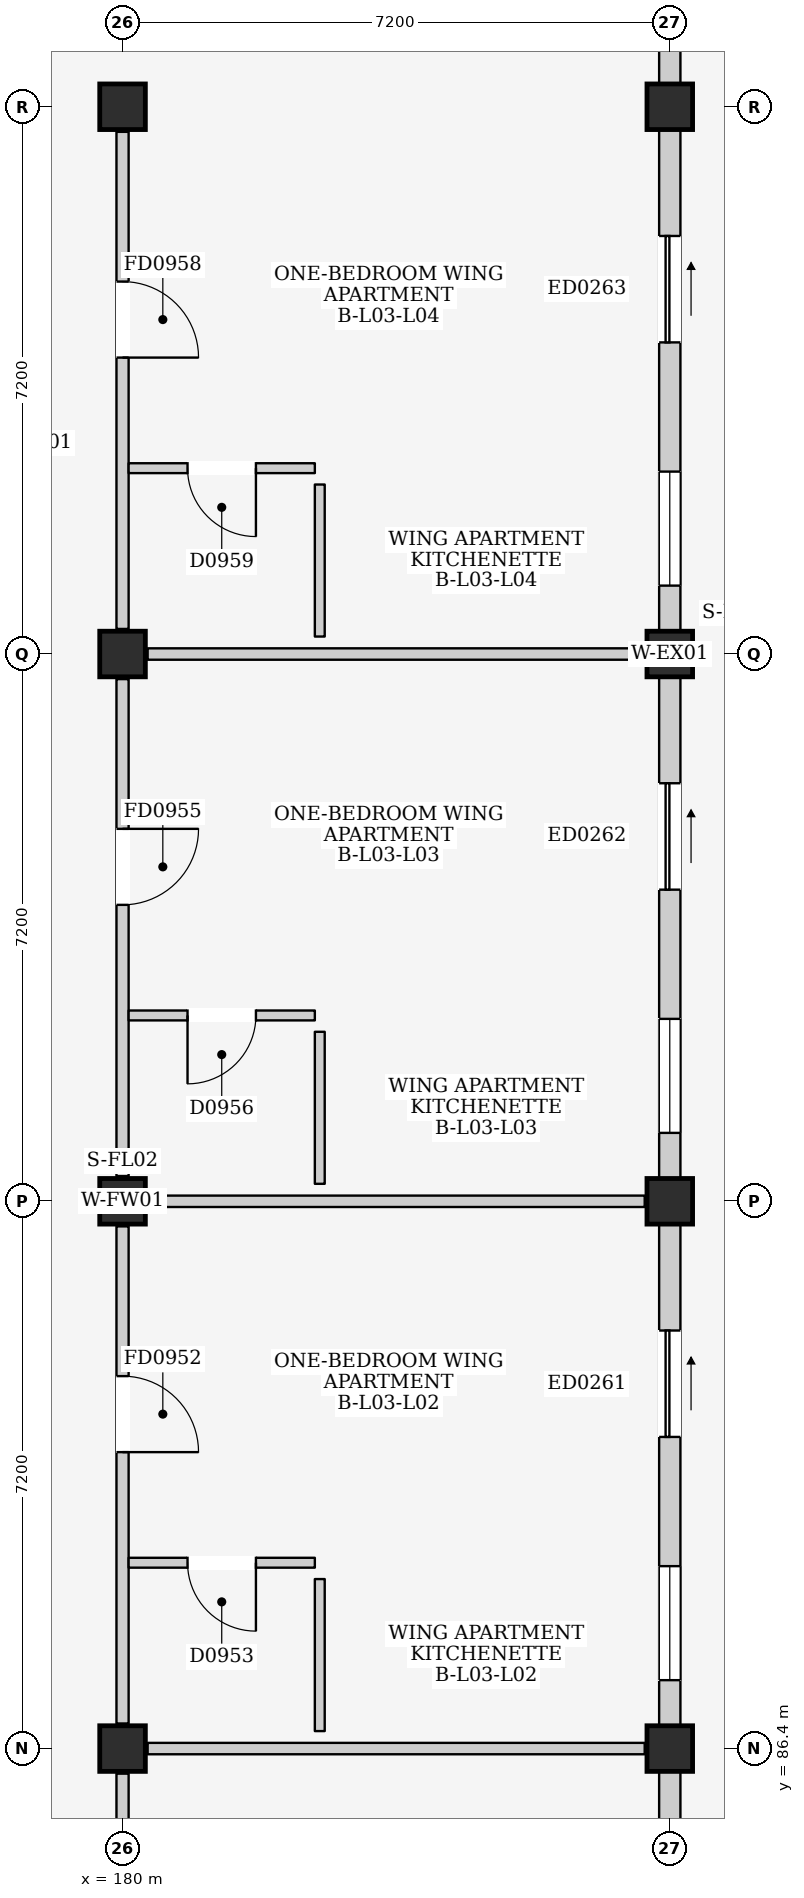
"""IFC4 building model, lengths in metres.
Left out: names, types, materials, properties, quantities, classifications, styles, units other than length and angle.
Written with IfcOpenShell. Run it as: python <this file> out.ifc"""

import sys

from ifc_helpers import new_model, si_unit, direction, frame, frame_2d, origin, origin_2d, place, context, subcontext, project, spatial, rectangle, extrude, element, fill, save


model = new_model("IFC4")
c1 = context("Model", 3, precision=1e-05, world=origin(), true_north=direction((0.0, 1.0)))
c2 = subcontext(c1, "Body", "Model", "MODEL_VIEW")
j1 = project(units=[si_unit("LENGTHUNIT", "METRE"), si_unit("PLANEANGLEUNIT", "RADIAN")], contexts=[c1])
p1 = place(None, origin())
s1 = spatial("IfcSite", under=j1, at=p1, CompositionType="ELEMENT")
p2 = place(p1, origin())
s2 = spatial("IfcBuilding", under=s1, at=p2, CompositionType="ELEMENT")
p3 = place(p2, frame((0.0, 0.0, 12.2)))
s3 = spatial("IfcBuildingStorey", under=s2, at=p3, CompositionType="ELEMENT", Elevation=12.2)
for number, where, z_axis, x_axis in (
    (1, (180.0, 86.4, 0.0), (0.0, 0.0, 1.0), (1.0, 0.0, 0.0)),
    (2, (180.0, 93.6, 0.0), (0.0, 0.0, 1.0), (1.0, 0.0, 0.0)),
    (3, (180.0, 100.8, 0.0), (0.0, 0.0, 1.0), (1.0, 0.0, 0.0)),
    (4, (180.0, 108.0, 0.0), (0.0, 0.0, 1.0), (1.0, 0.0, 0.0)),
    (5, (187.2, 86.4, 0.0), (0.0, 0.0, 1.0), (1.0, 0.0, 0.0)),
    (6, (187.2, 93.6, 0.0), (0.0, 0.0, 1.0), (1.0, 0.0, 0.0)),
    (7, (187.2, 100.8, 0.0), (0.0, 0.0, 1.0), (1.0, 0.0, 0.0)),
    (8, (187.2, 108.0, 0.0), (0.0, 0.0, 1.0), (1.0, 0.0, 0.0)),
):
    element("IfcColumn", number, at=place(p3, frame(where, z_axis=z_axis, x_axis=x_axis)), inside=s3, PredefinedType="COLUMN", context=c2, shape_type="SweptSolid", body=[
        extrude(rectangle(XDim=0.6, YDim=0.6, at=origin_2d()), origin(), (0.0, 0.0, 1.0), 3.2),
    ])
p4 = place(p3, frame((187.2, 79.5, 0.0), z_axis=(0.0, 0.0, 1.0), x_axis=(0.0, 1.0, 0.0)))
e9 = element("IfcWall", 9, at=p4, inside=s3, PredefinedType="ELEMENTEDWALL", context=c2, shape_type="SweptSolid", body=[
    extrude(rectangle(XDim=6.6, YDim=0.28, at=frame_2d((3.3, 0.0))), origin(), (0.0, 0.0, 1.0), 2.445),
])
p5 = place(p4, frame((3.8, 0.0, 0.0)))
e10 = element("IfcOpeningElement", 10, at=p5, cuts=e9, PredefinedType="OPENING", context=c2, shape_type="SweptSolid", body=[
    extrude(rectangle(XDim=1.4, YDim=2.1, at=frame_2d((0.7, 1.05))), frame((0.0, 0.155, 0.0), z_axis=(0.0, -1.0, 0.0), x_axis=(1.0, 0.0, 0.0)), (0.0, 0.0, 1.0), 0.31),
])
p6 = place(p4, frame((0.6, 0.0, 0.835)))
e11 = element("IfcOpeningElement", 11, at=p6, cuts=e9, PredefinedType="OPENING", context=c2, shape_type="SweptSolid", body=[
    extrude(rectangle(XDim=1.5, YDim=1.5, at=frame_2d((0.75, 0.75))), frame((0.0, 0.155, 0.0), z_axis=(0.0, -1.0, 0.0), x_axis=(1.0, 0.0, 0.0)), (0.0, 0.0, 1.0), 0.31),
])
p7 = place(p3, frame((187.2, 86.7, 0.0), z_axis=(0.0, 0.0, 1.0), x_axis=(0.0, 1.0, 0.0)))
e12 = element("IfcWall", 12, at=p7, inside=s3, PredefinedType="ELEMENTEDWALL", context=c2, shape_type="SweptSolid", body=[
    extrude(rectangle(XDim=6.6, YDim=0.28, at=frame_2d((3.3, 0.0))), origin(), (0.0, 0.0, 1.0), 2.445),
])
p8 = place(p7, frame((3.8, 0.0, 0.0)))
e13 = element("IfcOpeningElement", 13, at=p8, cuts=e12, PredefinedType="OPENING", context=c2, shape_type="SweptSolid", body=[
    extrude(rectangle(XDim=1.4, YDim=2.1, at=frame_2d((0.7, 1.05))), frame((0.0, 0.155, 0.0), z_axis=(0.0, -1.0, 0.0), x_axis=(1.0, 0.0, 0.0)), (0.0, 0.0, 1.0), 0.31),
])
p9 = place(p7, frame((0.6, 0.0, 0.835)))
e14 = element("IfcOpeningElement", 14, at=p9, cuts=e12, PredefinedType="OPENING", context=c2, shape_type="SweptSolid", body=[
    extrude(rectangle(XDim=1.5, YDim=1.5, at=frame_2d((0.75, 0.75))), frame((0.0, 0.155, 0.0), z_axis=(0.0, -1.0, 0.0), x_axis=(1.0, 0.0, 0.0)), (0.0, 0.0, 1.0), 0.31),
])
p10 = place(p3, frame((187.2, 93.9, 0.0), z_axis=(0.0, 0.0, 1.0), x_axis=(0.0, 1.0, 0.0)))
e15 = element("IfcWall", 15, at=p10, inside=s3, PredefinedType="ELEMENTEDWALL", context=c2, shape_type="SweptSolid", body=[
    extrude(rectangle(XDim=6.6, YDim=0.28, at=frame_2d((3.3, 0.0))), origin(), (0.0, 0.0, 1.0), 2.445),
])
p11 = place(p10, frame((3.8, 0.0, 0.0)))
e16 = element("IfcOpeningElement", 16, at=p11, cuts=e15, PredefinedType="OPENING", context=c2, shape_type="SweptSolid", body=[
    extrude(rectangle(XDim=1.4, YDim=2.1, at=frame_2d((0.7, 1.05))), frame((0.0, 0.155, 0.0), z_axis=(0.0, -1.0, 0.0), x_axis=(1.0, 0.0, 0.0)), (0.0, 0.0, 1.0), 0.31),
])
p12 = place(p10, frame((0.6, 0.0, 0.835)))
e17 = element("IfcOpeningElement", 17, at=p12, cuts=e15, PredefinedType="OPENING", context=c2, shape_type="SweptSolid", body=[
    extrude(rectangle(XDim=1.5, YDim=1.5, at=frame_2d((0.75, 0.75))), frame((0.0, 0.155, 0.0), z_axis=(0.0, -1.0, 0.0), x_axis=(1.0, 0.0, 0.0)), (0.0, 0.0, 1.0), 0.31),
])
p13 = place(p3, frame((187.2, 101.1, 0.0), z_axis=(0.0, 0.0, 1.0), x_axis=(0.0, 1.0, 0.0)))
e18 = element("IfcWall", 18, at=p13, inside=s3, PredefinedType="ELEMENTEDWALL", context=c2, shape_type="SweptSolid", body=[
    extrude(rectangle(XDim=6.6, YDim=0.28, at=frame_2d((3.3, 0.0))), origin(), (0.0, 0.0, 1.0), 2.445),
])
p14 = place(p13, frame((3.8, 0.0, 0.0)))
e19 = element("IfcOpeningElement", 19, at=p14, cuts=e18, PredefinedType="OPENING", context=c2, shape_type="SweptSolid", body=[
    extrude(rectangle(XDim=1.4, YDim=2.1, at=frame_2d((0.7, 1.05))), frame((0.0, 0.155, 0.0), z_axis=(0.0, -1.0, 0.0), x_axis=(1.0, 0.0, 0.0)), (0.0, 0.0, 1.0), 0.31),
])
p15 = place(p13, frame((0.6, 0.0, 0.835)))
e20 = element("IfcOpeningElement", 20, at=p15, cuts=e18, PredefinedType="OPENING", context=c2, shape_type="SweptSolid", body=[
    extrude(rectangle(XDim=1.5, YDim=1.5, at=frame_2d((0.75, 0.75))), frame((0.0, 0.155, 0.0), z_axis=(0.0, -1.0, 0.0), x_axis=(1.0, 0.0, 0.0)), (0.0, 0.0, 1.0), 0.31),
])
p16 = place(p3, frame((187.2, 108.3, 0.0), z_axis=(0.0, 0.0, 1.0), x_axis=(0.0, 1.0, 0.0)))
e21 = element("IfcWall", 21, at=p16, inside=s3, PredefinedType="ELEMENTEDWALL", context=c2, shape_type="SweptSolid", body=[
    extrude(rectangle(XDim=6.6, YDim=0.28, at=frame_2d((3.3, 0.0))), origin(), (0.0, 0.0, 1.0), 2.445),
])
p17 = place(p16, frame((3.65, 0.0, 0.0)))
e22 = element("IfcOpeningElement", 22, at=p17, cuts=e21, PredefinedType="OPENING", context=c2, shape_type="SweptSolid", body=[
    extrude(rectangle(XDim=1.4, YDim=2.1, at=frame_2d((0.7, 1.05))), frame((0.0, 0.155, 0.0), z_axis=(0.0, -1.0, 0.0), x_axis=(1.0, 0.0, 0.0)), (0.0, 0.0, 1.0), 0.31),
])
p18 = place(p3, frame((180.0, 79.53, 0.0), z_axis=(0.0, 0.0, 1.0), x_axis=(0.0, 1.0, 0.0)))
e23 = element("IfcWall", 23, at=p18, inside=s3, PredefinedType="PARTITIONING", context=c2, shape_type="SweptSolid", body=[
    extrude(rectangle(XDim=6.54, YDim=0.16, at=frame_2d((3.27, 0.0))), origin(), (0.0, 0.0, 1.0), 2.415),
])
p19 = place(p18, frame((3.57, 0.0, 0.0)))
e24 = element("IfcOpeningElement", 24, at=p19, cuts=e23, PredefinedType="OPENING", context=c2, shape_type="SweptSolid", body=[
    extrude(rectangle(XDim=1.0, YDim=2.15, at=frame_2d((0.5, 1.075))), frame((0.0, 0.095, 0.0), z_axis=(0.0, -1.0, 0.0), x_axis=(1.0, 0.0, 0.0)), (0.0, 0.0, 1.0), 0.19),
])
p20 = place(p3, frame((180.33, 86.4, 0.0), z_axis=(0.0, 0.0, 1.0), x_axis=(1.0, 0.0, 0.0)))
e25 = element("IfcWall", 25, at=p20, inside=s3, PredefinedType="PARTITIONING", context=c2, shape_type="SweptSolid", body=[
    extrude(rectangle(XDim=6.54, YDim=0.15, at=frame_2d((3.27, 0.0))), origin(), (0.0, 0.0, 1.0), 2.365),
])
p21 = place(p3, frame((180.0, 86.73, 0.0), z_axis=(0.0, 0.0, 1.0), x_axis=(0.0, 1.0, 0.0)))
e26 = element("IfcWall", 26, at=p21, inside=s3, PredefinedType="PARTITIONING", context=c2, shape_type="SweptSolid", body=[
    extrude(rectangle(XDim=6.54, YDim=0.16, at=frame_2d((3.27, 0.0))), origin(), (0.0, 0.0, 1.0), 2.415),
])
p22 = place(p21, frame((3.57, 0.0, 0.0)))
e27 = element("IfcOpeningElement", 27, at=p22, cuts=e26, PredefinedType="OPENING", context=c2, shape_type="SweptSolid", body=[
    extrude(rectangle(XDim=1.0, YDim=2.15, at=frame_2d((0.5, 1.075))), frame((0.0, 0.095, 0.0), z_axis=(0.0, -1.0, 0.0), x_axis=(1.0, 0.0, 0.0)), (0.0, 0.0, 1.0), 0.19),
])
p23 = place(p3, frame((180.33, 93.6, 0.0), z_axis=(0.0, 0.0, 1.0), x_axis=(1.0, 0.0, 0.0)))
e28 = element("IfcWall", 28, at=p23, inside=s3, PredefinedType="PARTITIONING", context=c2, shape_type="SweptSolid", body=[
    extrude(rectangle(XDim=6.54, YDim=0.15, at=frame_2d((3.27, 0.0))), origin(), (0.0, 0.0, 1.0), 2.365),
])
p24 = place(p3, frame((180.08, 88.845, 0.0), z_axis=(0.0, 0.0, 1.0), x_axis=(1.0, 0.0, 0.0)))
e29 = element("IfcWall", 29, at=p24, inside=s3, PredefinedType="PARTITIONING", context=c2, shape_type="SweptSolid", body=[
    extrude(rectangle(XDim=2.45, YDim=0.13, at=frame_2d((1.225, 0.0))), origin(), (0.0, 0.0, 1.0), 2.98),
])
p25 = place(p24, frame((0.775, 0.0, 0.0)))
e30 = element("IfcOpeningElement", 30, at=p25, cuts=e29, PredefinedType="OPENING", context=c2, shape_type="SweptSolid", body=[
    extrude(rectangle(XDim=0.9, YDim=2.1, at=frame_2d((0.45, 1.05))), frame((0.0, 0.08, 0.0), z_axis=(0.0, -1.0, 0.0), x_axis=(1.0, 0.0, 0.0)), (0.0, 0.0, 1.0), 0.16),
])
p26 = place(p3, frame((182.595, 86.63, 0.0), z_axis=(0.0, 0.0, 1.0), x_axis=(0.0, 1.0, 0.0)))
e31 = element("IfcWall", 31, at=p26, inside=s3, PredefinedType="PARTITIONING", context=c2, shape_type="SweptSolid", body=[
    extrude(rectangle(XDim=2.0, YDim=0.13, at=frame_2d((1.0, 0.0))), origin(), (0.0, 0.0, 1.0), 2.98),
])
p27 = place(p3, frame((180.0, 93.93, 0.0), z_axis=(0.0, 0.0, 1.0), x_axis=(0.0, 1.0, 0.0)))
e32 = element("IfcWall", 32, at=p27, inside=s3, PredefinedType="PARTITIONING", context=c2, shape_type="SweptSolid", body=[
    extrude(rectangle(XDim=6.54, YDim=0.16, at=frame_2d((3.27, 0.0))), origin(), (0.0, 0.0, 1.0), 2.415),
])
p28 = place(p27, frame((3.57, 0.0, 0.0)))
e33 = element("IfcOpeningElement", 33, at=p28, cuts=e32, PredefinedType="OPENING", context=c2, shape_type="SweptSolid", body=[
    extrude(rectangle(XDim=1.0, YDim=2.15, at=frame_2d((0.5, 1.075))), frame((0.0, 0.095, 0.0), z_axis=(0.0, -1.0, 0.0), x_axis=(1.0, 0.0, 0.0)), (0.0, 0.0, 1.0), 0.19),
])
p29 = place(p3, frame((180.33, 100.8, 0.0), z_axis=(0.0, 0.0, 1.0), x_axis=(1.0, 0.0, 0.0)))
e34 = element("IfcWall", 34, at=p29, inside=s3, PredefinedType="PARTITIONING", context=c2, shape_type="SweptSolid", body=[
    extrude(rectangle(XDim=6.54, YDim=0.15, at=frame_2d((3.27, 0.0))), origin(), (0.0, 0.0, 1.0), 2.365),
])
p30 = place(p3, frame((180.08, 96.045, 0.0), z_axis=(0.0, 0.0, 1.0), x_axis=(1.0, 0.0, 0.0)))
e35 = element("IfcWall", 35, at=p30, inside=s3, PredefinedType="PARTITIONING", context=c2, shape_type="SweptSolid", body=[
    extrude(rectangle(XDim=2.45, YDim=0.13, at=frame_2d((1.225, 0.0))), origin(), (0.0, 0.0, 1.0), 2.98),
])
p31 = place(p30, frame((0.775, 0.0, 0.0)))
e36 = element("IfcOpeningElement", 36, at=p31, cuts=e35, PredefinedType="OPENING", context=c2, shape_type="SweptSolid", body=[
    extrude(rectangle(XDim=0.9, YDim=2.1, at=frame_2d((0.45, 1.05))), frame((0.0, 0.08, 0.0), z_axis=(0.0, -1.0, 0.0), x_axis=(1.0, 0.0, 0.0)), (0.0, 0.0, 1.0), 0.16),
])
p32 = place(p3, frame((182.595, 93.83, 0.0), z_axis=(0.0, 0.0, 1.0), x_axis=(0.0, 1.0, 0.0)))
e37 = element("IfcWall", 37, at=p32, inside=s3, PredefinedType="PARTITIONING", context=c2, shape_type="SweptSolid", body=[
    extrude(rectangle(XDim=2.0, YDim=0.13, at=frame_2d((1.0, 0.0))), origin(), (0.0, 0.0, 1.0), 2.98),
])
p33 = place(p3, frame((180.0, 101.13, 0.0), z_axis=(0.0, 0.0, 1.0), x_axis=(0.0, 1.0, 0.0)))
e38 = element("IfcWall", 38, at=p33, inside=s3, PredefinedType="PARTITIONING", context=c2, shape_type="SweptSolid", body=[
    extrude(rectangle(XDim=6.54, YDim=0.16, at=frame_2d((3.27, 0.0))), origin(), (0.0, 0.0, 1.0), 2.415),
])
p34 = place(p33, frame((3.57, 0.0, 0.0)))
e39 = element("IfcOpeningElement", 39, at=p34, cuts=e38, PredefinedType="OPENING", context=c2, shape_type="SweptSolid", body=[
    extrude(rectangle(XDim=1.0, YDim=2.15, at=frame_2d((0.5, 1.075))), frame((0.0, 0.095, 0.0), z_axis=(0.0, -1.0, 0.0), x_axis=(1.0, 0.0, 0.0)), (0.0, 0.0, 1.0), 0.19),
])
p35 = place(p3, frame((180.08, 103.245, 0.0), z_axis=(0.0, 0.0, 1.0), x_axis=(1.0, 0.0, 0.0)))
e40 = element("IfcWall", 40, at=p35, inside=s3, PredefinedType="PARTITIONING", context=c2, shape_type="SweptSolid", body=[
    extrude(rectangle(XDim=2.45, YDim=0.13, at=frame_2d((1.225, 0.0))), origin(), (0.0, 0.0, 1.0), 2.98),
])
p36 = place(p35, frame((0.775, 0.0, 0.0)))
e41 = element("IfcOpeningElement", 41, at=p36, cuts=e40, PredefinedType="OPENING", context=c2, shape_type="SweptSolid", body=[
    extrude(rectangle(XDim=0.9, YDim=2.1, at=frame_2d((0.45, 1.05))), frame((0.0, 0.08, 0.0), z_axis=(0.0, -1.0, 0.0), x_axis=(1.0, 0.0, 0.0)), (0.0, 0.0, 1.0), 0.16),
])
p37 = place(p3, frame((182.595, 101.03, 0.0), z_axis=(0.0, 0.0, 1.0), x_axis=(0.0, 1.0, 0.0)))
e42 = element("IfcWall", 42, at=p37, inside=s3, PredefinedType="PARTITIONING", context=c2, shape_type="SweptSolid", body=[
    extrude(rectangle(XDim=2.0, YDim=0.13, at=frame_2d((1.0, 0.0))), origin(), (0.0, 0.0, 1.0), 2.98),
])
p38 = place(p8, frame((1.4, 0.0, 0.0), z_axis=(0.0, 0.0, 1.0), x_axis=(-1.0, 0.0, 0.0)))
e43 = element("IfcDoor", 43, at=p38, inside=s3, OperationType="SLIDING_TO_RIGHT", PredefinedType="DOOR", context=c2, shape_type="SweptSolid", body=[
    extrude(rectangle(XDim=1.4, YDim=2.1, at=frame_2d((0.7, 1.05))), frame((0.0, 0.025, 0.0), z_axis=(0.0, -1.0, 0.0), x_axis=(1.0, 0.0, 0.0)), (0.0, 0.0, 1.0), 0.05),
])
fill(e13, e43)
p39 = place(p9, origin())
e44 = element("IfcWindow", 44, at=p39, inside=s3, PartitioningType="DOUBLE_PANEL_VERTICAL", PredefinedType="WINDOW", context=c2, shape_type="SweptSolid", body=[
    extrude(rectangle(XDim=1.5, YDim=1.5, at=frame_2d((0.75, 0.75))), frame((0.0, 0.03, 0.0), z_axis=(0.0, -1.0, 0.0), x_axis=(1.0, 0.0, 0.0)), (0.0, 0.0, 1.0), 0.06),
])
fill(e14, e44)
p40 = place(p11, frame((1.4, 0.0, 0.0), z_axis=(0.0, 0.0, 1.0), x_axis=(-1.0, 0.0, 0.0)))
e45 = element("IfcDoor", 45, at=p40, inside=s3, OperationType="SLIDING_TO_RIGHT", PredefinedType="DOOR", context=c2, shape_type="SweptSolid", body=[
    extrude(rectangle(XDim=1.4, YDim=2.1, at=frame_2d((0.7, 1.05))), frame((0.0, 0.025, 0.0), z_axis=(0.0, -1.0, 0.0), x_axis=(1.0, 0.0, 0.0)), (0.0, 0.0, 1.0), 0.05),
])
fill(e16, e45)
p41 = place(p12, origin())
e46 = element("IfcWindow", 46, at=p41, inside=s3, PartitioningType="DOUBLE_PANEL_VERTICAL", PredefinedType="WINDOW", context=c2, shape_type="SweptSolid", body=[
    extrude(rectangle(XDim=1.5, YDim=1.5, at=frame_2d((0.75, 0.75))), frame((0.0, 0.03, 0.0), z_axis=(0.0, -1.0, 0.0), x_axis=(1.0, 0.0, 0.0)), (0.0, 0.0, 1.0), 0.06),
])
fill(e17, e46)
p42 = place(p14, frame((1.4, 0.0, 0.0), z_axis=(0.0, 0.0, 1.0), x_axis=(-1.0, 0.0, 0.0)))
e47 = element("IfcDoor", 47, at=p42, inside=s3, OperationType="SLIDING_TO_RIGHT", PredefinedType="DOOR", context=c2, shape_type="SweptSolid", body=[
    extrude(rectangle(XDim=1.4, YDim=2.1, at=frame_2d((0.7, 1.05))), frame((0.0, 0.025, 0.0), z_axis=(0.0, -1.0, 0.0), x_axis=(1.0, 0.0, 0.0)), (0.0, 0.0, 1.0), 0.05),
])
fill(e19, e47)
p43 = place(p15, origin())
e48 = element("IfcWindow", 48, at=p43, inside=s3, PartitioningType="DOUBLE_PANEL_VERTICAL", PredefinedType="WINDOW", context=c2, shape_type="SweptSolid", body=[
    extrude(rectangle(XDim=1.5, YDim=1.5, at=frame_2d((0.75, 0.75))), frame((0.0, 0.03, 0.0), z_axis=(0.0, -1.0, 0.0), x_axis=(1.0, 0.0, 0.0)), (0.0, 0.0, 1.0), 0.06),
])
fill(e20, e48)
p44 = place(p22, frame((1.0, 0.0, 0.0), z_axis=(0.0, 0.0, 1.0), x_axis=(-1.0, 0.0, 0.0)))
e49 = element("IfcDoor", 49, at=p44, inside=s3, OperationType="SINGLE_SWING_RIGHT", PredefinedType="DOOR", context=c2, shape_type="SweptSolid", body=[
    extrude(rectangle(XDim=1.0, YDim=2.15, at=frame_2d((0.5, 1.075))), frame((0.0, 0.025, 0.0), z_axis=(0.0, -1.0, 0.0), x_axis=(1.0, 0.0, 0.0)), (0.0, 0.0, 1.0), 0.05),
])
fill(e27, e49)
p45 = place(p25, frame((0.9, 0.0, 0.0), z_axis=(0.0, 0.0, 1.0), x_axis=(-1.0, 0.0, 0.0)))
e50 = element("IfcDoor", 50, at=p45, inside=s3, OperationType="SINGLE_SWING_LEFT", PredefinedType="DOOR", context=c2, shape_type="SweptSolid", body=[
    extrude(rectangle(XDim=0.9, YDim=2.1, at=frame_2d((0.45, 1.05))), frame((0.0, 0.025, 0.0), z_axis=(0.0, -1.0, 0.0), x_axis=(1.0, 0.0, 0.0)), (0.0, 0.0, 1.0), 0.05),
])
fill(e30, e50)
p46 = place(p28, frame((1.0, 0.0, 0.0), z_axis=(0.0, 0.0, 1.0), x_axis=(-1.0, 0.0, 0.0)))
e51 = element("IfcDoor", 51, at=p46, inside=s3, OperationType="SINGLE_SWING_LEFT", PredefinedType="DOOR", context=c2, shape_type="SweptSolid", body=[
    extrude(rectangle(XDim=1.0, YDim=2.15, at=frame_2d((0.5, 1.075))), frame((0.0, 0.025, 0.0), z_axis=(0.0, -1.0, 0.0), x_axis=(1.0, 0.0, 0.0)), (0.0, 0.0, 1.0), 0.05),
])
fill(e33, e51)
p47 = place(p31, frame((0.9, 0.0, 0.0), z_axis=(0.0, 0.0, 1.0), x_axis=(-1.0, 0.0, 0.0)))
e52 = element("IfcDoor", 52, at=p47, inside=s3, OperationType="SINGLE_SWING_RIGHT", PredefinedType="DOOR", context=c2, shape_type="SweptSolid", body=[
    extrude(rectangle(XDim=0.9, YDim=2.1, at=frame_2d((0.45, 1.05))), frame((0.0, 0.025, 0.0), z_axis=(0.0, -1.0, 0.0), x_axis=(1.0, 0.0, 0.0)), (0.0, 0.0, 1.0), 0.05),
])
fill(e36, e52)
p48 = place(p34, frame((1.0, 0.0, 0.0), z_axis=(0.0, 0.0, 1.0), x_axis=(-1.0, 0.0, 0.0)))
e53 = element("IfcDoor", 53, at=p48, inside=s3, OperationType="SINGLE_SWING_RIGHT", PredefinedType="DOOR", context=c2, shape_type="SweptSolid", body=[
    extrude(rectangle(XDim=1.0, YDim=2.15, at=frame_2d((0.5, 1.075))), frame((0.0, 0.025, 0.0), z_axis=(0.0, -1.0, 0.0), x_axis=(1.0, 0.0, 0.0)), (0.0, 0.0, 1.0), 0.05),
])
fill(e39, e53)
p49 = place(p36, frame((0.9, 0.0, 0.0), z_axis=(0.0, 0.0, 1.0), x_axis=(-1.0, 0.0, 0.0)))
e54 = element("IfcDoor", 54, at=p49, inside=s3, OperationType="SINGLE_SWING_LEFT", PredefinedType="DOOR", context=c2, shape_type="SweptSolid", body=[
    extrude(rectangle(XDim=0.9, YDim=2.1, at=frame_2d((0.45, 1.05))), frame((0.0, 0.025, 0.0), z_axis=(0.0, -1.0, 0.0), x_axis=(1.0, 0.0, 0.0)), (0.0, 0.0, 1.0), 0.05),
])
fill(e41, e54)
save(model, sys.argv[1])
